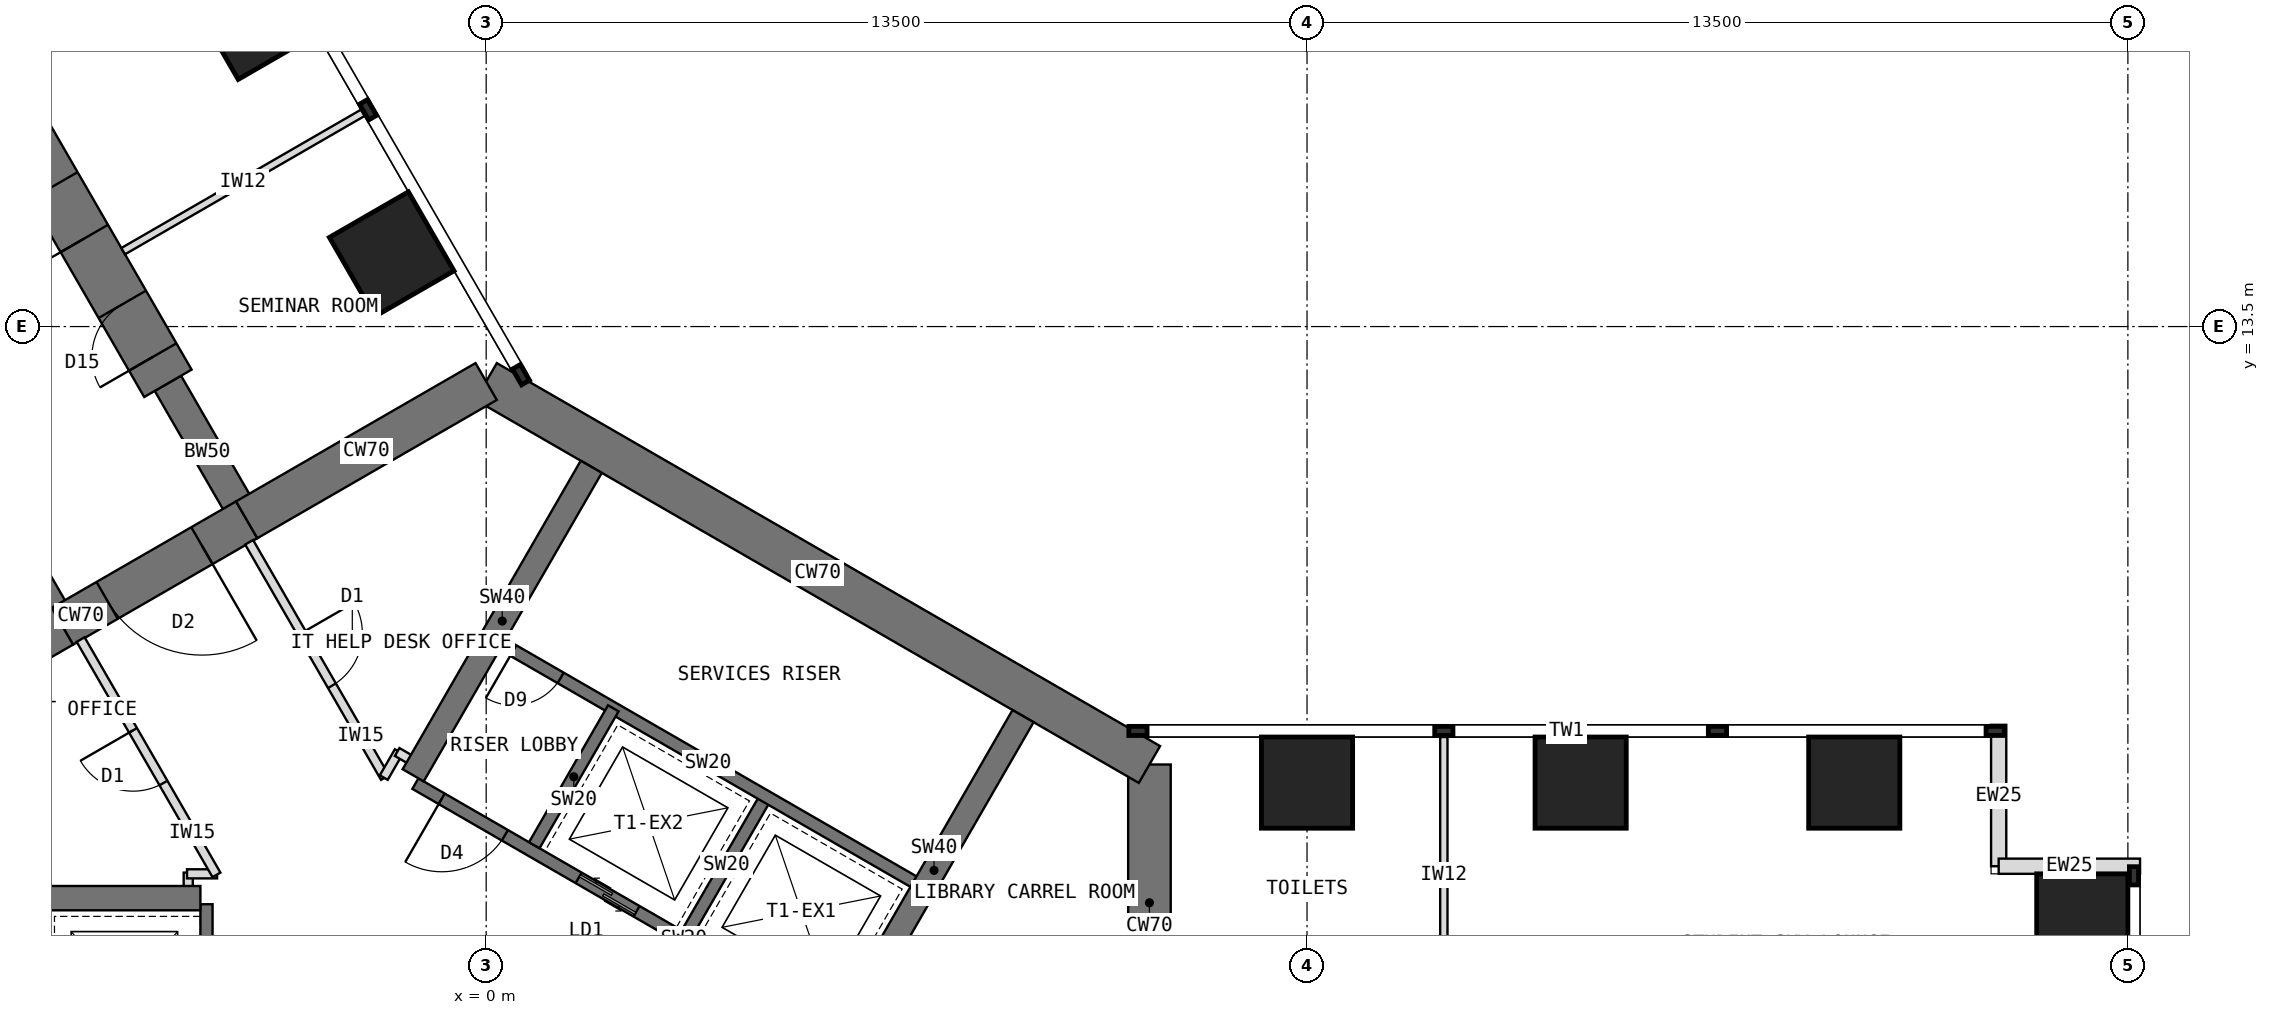
"""IFC4 building model, lengths in metres.
Left out: names, types, materials, properties, quantities, classifications, styles, units other than length and angle.
Written with IfcOpenShell. Run it as: python <this file> out.ifc"""

import sys

from ifc_helpers import new_model, si_unit, direction, frame, frame_2d, origin, origin_2d, place, context, subcontext, project, spatial, rectangle, extrude, element, fill, save


model = new_model("IFC4")
c1 = context("Model", 3, precision=1e-05, world=origin(), true_north=direction((0.0, 1.0)))
c2 = subcontext(c1, "Body", "Model", "MODEL_VIEW")
j1 = project(units=[si_unit("LENGTHUNIT", "METRE"), si_unit("PLANEANGLEUNIT", "RADIAN")], contexts=[c1])
p1 = place(None, origin())
s1 = spatial("IfcSite", under=j1, at=p1, CompositionType="ELEMENT")
p2 = place(p1, origin())
s2 = spatial("IfcBuilding", under=s1, at=p2, CompositionType="ELEMENT")
p3 = place(p2, frame((0.0, 0.0, 20.5)))
s3 = spatial("IfcBuildingStorey", under=s2, at=p3, CompositionType="ELEMENT", Elevation=20.5)
p4 = place(p3, frame((10.908, 1.75, 0.0), z_axis=(0.0, 0.0, 1.0), x_axis=(0.0, 1.0, 0.0)))
e1 = element("IfcWall", 1, at=p4, inside=s3, PredefinedType="SHEAR", context=c2, shape_type="SweptSolid", body=[
    extrude(rectangle(XDim=4.548, YDim=0.7, at=frame_2d((2.274, 0.0))), origin(), (0.0, 0.0, 1.0), 4.0),
])
p5 = place(p3, frame((10.908, 6.298, 0.0), z_axis=(0.0, 0.0, 1.0), x_axis=(-0.866021940709, 0.500005998175, 0.0)))
e2 = element("IfcWall", 2, at=p5, inside=s3, PredefinedType="SHEAR", context=c2, shape_type="SweptSolid", body=[
    extrude(rectangle(XDim=12.596, YDim=0.7, at=frame_2d((6.298, 0.0))), origin(), (0.0, 0.0, 1.0), 4.0),
])
p6 = place(p3, frame((0.0, 12.596, 0.0), z_axis=(0.0, 0.0, 1.0), x_axis=(-0.866011268655, -0.500024481964, 0.0)))
e3 = element("IfcWall", 3, at=p6, inside=s3, PredefinedType="SHEAR", context=c2, shape_type="SweptSolid", body=[
    extrude(rectangle(XDim=4.548, YDim=0.7, at=frame_2d((2.274, 0.0))), origin(), (0.0, 0.0, 1.0), 4.0),
])
p7 = place(p3, frame((-3.939, 10.322, 0.0), z_axis=(0.0, 0.0, 1.0), x_axis=(-0.866019471182, -0.500010275428, 0.0)))
e4 = element("IfcWall", 4, at=p7, inside=s3, PredefinedType="SHEAR", context=c2, shape_type="SweptSolid", body=[
    extrude(rectangle(XDim=3.5, YDim=0.7, at=frame_2d((1.75, 0.0))), origin(), (0.0, 0.0, 1.0), 4.0),
])
p8 = place(p7, frame((0.85, 0.0, 0.0)))
e5 = element("IfcOpeningElement", 5, at=p8, cuts=e4, PredefinedType="OPENING", context=c2, shape_type="SweptSolid", body=[
    extrude(rectangle(XDim=1.8, YDim=2.1, at=frame_2d((0.9, 1.05))), frame((0.0, 0.36, 0.0), z_axis=(0.0, -1.0, 0.0), x_axis=(1.0, 0.0, 0.0)), (0.0, 0.0, 1.0), 0.72),
])
p9 = place(p3, frame((-6.97, 8.572, 0.0), z_axis=(0.0, 0.0, 1.0), x_axis=(-0.866034513004, -0.499984222037, 0.0)))
e6 = element("IfcWall", 6, at=p9, inside=s3, PredefinedType="SHEAR", context=c2, shape_type="SweptSolid", body=[
    extrude(rectangle(XDim=4.548, YDim=0.7, at=frame_2d((2.274, 0.0))), origin(), (0.0, 0.0, 1.0), 4.0),
])
for number, where, z_axis, x_axis in (
    (7, (-6.97, 8.572, 0.0), (0.0, 0.0, 1.0), (-0.5, 0.866, 0.0)),
    (8, (-3.939, 10.322, 0.0), (0.0, 0.0, 1.0), (-0.5, 0.866, 0.0)),
):
    element("IfcWall", number, at=place(p3, frame(where, z_axis=z_axis, x_axis=x_axis)), inside=s3, PredefinedType="SHEAR", context=c2, shape_type="SweptSolid", body=[
        extrude(rectangle(XDim=2.592, YDim=0.5, at=frame_2d((1.296, 0.0))), origin(), (0.0, 0.0, 1.0), 4.0),
    ])
p10 = place(p3, frame((-5.234, 12.566, 0.0), z_axis=(0.0, 0.0, 1.0), x_axis=(-0.500010103361, 0.866019570528, 0.0)))
e9 = element("IfcWall", 9, at=p10, inside=s3, PredefinedType="SHEAR", context=c2, shape_type="SweptSolid", body=[
    extrude(rectangle(XDim=13.2, YDim=0.9, at=frame_2d((6.6, 0.0))), origin(), (0.0, 0.0, 1.0), 4.0),
])
p11 = place(p10, frame((0.5, 0.0, 0.0)))
e10 = element("IfcOpeningElement", 10, at=p11, cuts=e9, PredefinedType="OPENING", context=c2, shape_type="SweptSolid", body=[
    extrude(rectangle(XDim=1.0, YDim=2.1, at=frame_2d((0.5, 1.05))), frame((0.0, 0.46, 0.0), z_axis=(0.0, -1.0, 0.0), x_axis=(1.0, 0.0, 0.0)), (0.0, 0.0, 1.0), 0.92),
])
p12 = place(p10, frame((2.75, 0.0, 0.0)))
e11 = element("IfcOpeningElement", 11, at=p12, cuts=e9, PredefinedType="OPENING", context=c2, shape_type="SweptSolid", body=[
    extrude(rectangle(XDim=1.0, YDim=2.1, at=frame_2d((0.5, 1.05))), frame((0.0, 0.46, 0.0), z_axis=(0.0, -1.0, 0.0), x_axis=(1.0, 0.0, 0.0)), (0.0, 0.0, 1.0), 0.92),
])
for number, where, z_axis, x_axis in (
    (12, (13.5, 6.0, 0.0), (0.0, 0.0, 1.0), (1.0, 0.0, 0.0)),
    (13, (18.0, 6.0, 0.0), (0.0, 0.0, 1.0), (1.0, 0.0, 0.0)),
    (14, (22.5, 6.0, 0.0), (0.0, 0.0, 1.0), (1.0, 0.0, 0.0)),
    (15, (26.25, 3.75, 0.0), (0.0, 0.0, 1.0), (1.0, 0.0, 0.0)),
    (16, (-1.554, 14.691, 0.0), (0.0, 0.0, 1.0), (0.866, 0.5, 0.0)),
    (17, (-3.804, 18.588, 0.0), (0.0, 0.0, 1.0), (0.866, 0.5, 0.0)),
):
    element("IfcColumn", number, at=place(p3, frame(where, z_axis=z_axis, x_axis=x_axis)), inside=s3, PredefinedType="COLUMN", context=c2, shape_type="SweptSolid", body=[
        extrude(rectangle(XDim=1.5, YDim=1.5, at=origin_2d()), origin(), (0.0, 0.0, 1.0), 4.0),
    ])
for number, where, z_axis, x_axis in (
    (18, (24.875, 6.95, 0.0), (0.0, 0.0, 1.0), (0.0, -1.0, 0.0)),
    (19, (24.875, 4.625, 0.0), (0.0, 0.0, 1.0), (1.0, 0.0, 0.0)),
):
    element("IfcWall", number, at=place(p3, frame(where, z_axis=z_axis, x_axis=x_axis)), inside=s3, PredefinedType="STANDARD", context=c2, shape_type="SweptSolid", body=[
        extrude(rectangle(XDim=2.325, YDim=0.25, at=frame_2d((1.163, 0.0))), origin(), (0.0, 0.0, 1.0), 3.8),
    ])
p13 = place(p3, frame((5.764, 1.984, 0.0), z_axis=(0.0, 0.0, 1.0), x_axis=(-0.866026010844, 0.49999894854, 0.0)))
e20 = element("IfcWall", 20, at=p13, inside=s3, PredefinedType="SHEAR", context=c2, shape_type="SweptSolid", body=[
    extrude(rectangle(XDim=8.0, YDim=0.2, at=frame_2d((4.0, 0.0))), origin(), (0.0, 0.0, 1.0), 4.0),
])
p14 = place(p13, frame((6.3, 0.0, 0.0)))
e21 = element("IfcOpeningElement", 21, at=p14, cuts=e20, PredefinedType="OPENING", context=c2, shape_type="SweptSolid", body=[
    extrude(rectangle(XDim=1.2, YDim=2.1, at=frame_2d((0.6, 1.05))), frame((0.0, 0.11, 0.0), z_axis=(0.0, -1.0, 0.0), x_axis=(1.0, 0.0, 0.0)), (0.0, 0.0, 1.0), 0.22),
])
p15 = place(p13, frame((0.9, 0.0, 0.0)))
e22 = element("IfcOpeningElement", 22, at=p15, cuts=e20, PredefinedType="OPENING", context=c2, shape_type="SweptSolid", body=[
    extrude(rectangle(XDim=1.1, YDim=2.2, at=frame_2d((0.55, 1.1))), frame((0.0, 0.11, 0.0), z_axis=(0.0, -1.0, 0.0), x_axis=(1.0, 0.0, 0.0)), (0.0, 0.0, 1.0), 0.22),
])
p16 = place(p13, frame((3.8, 0.0, 0.0)))
e23 = element("IfcOpeningElement", 23, at=p16, cuts=e20, PredefinedType="OPENING", context=c2, shape_type="SweptSolid", body=[
    extrude(rectangle(XDim=1.1, YDim=2.2, at=frame_2d((0.55, 1.1))), frame((0.0, 0.11, 0.0), z_axis=(0.0, -1.0, 0.0), x_axis=(1.0, 0.0, 0.0)), (0.0, 0.0, 1.0), 0.22),
])
for number, where, z_axis, x_axis in (
    (24, (3.303, 3.52, 0.0), (0.0, 0.0, 1.0), (0.5, 0.866, 0.0)),
    (25, (0.791, 4.97, 0.0), (0.0, 0.0, 1.0), (0.5, 0.866, 0.0)),
):
    element("IfcWall", number, at=place(p3, frame(where, z_axis=z_axis, x_axis=x_axis)), inside=s3, PredefinedType="SHEAR", context=c2, shape_type="SweptSolid", body=[
        extrude(rectangle(XDim=2.6, YDim=0.2, at=frame_2d((1.3, 0.0))), origin(), (0.0, 0.0, 1.0), 4.0),
    ])
p17 = place(p3, frame((7.114, 4.322, 0.0), z_axis=(0.0, 0.0, 1.0), x_axis=(-0.866026010844, 0.49999894854, 0.0)))
e26 = element("IfcWall", 26, at=p17, inside=s3, PredefinedType="SHEAR", context=c2, shape_type="SweptSolid", body=[
    extrude(rectangle(XDim=8.0, YDim=0.2, at=frame_2d((4.0, 0.0))), origin(), (0.0, 0.0, 1.0), 4.0),
])
p18 = place(p17, frame((6.8, 0.0, 0.0)))
e27 = element("IfcOpeningElement", 27, at=p18, cuts=e26, PredefinedType="OPENING", context=c2, shape_type="SweptSolid", body=[
    extrude(rectangle(XDim=0.9, YDim=2.1, at=frame_2d((0.45, 1.05))), frame((0.0, 0.11, 0.0), z_axis=(0.0, -1.0, 0.0), x_axis=(1.0, 0.0, 0.0)), (0.0, 0.0, 1.0), 0.22),
])
for number, where, z_axis, x_axis in (
    (28, (-1.201, 6.12, 0.0), (0.0, 0.0, 1.0), (0.5, 0.866, 0.0)),
    (29, (5.901, 2.02, 0.0), (0.0, 0.0, 1.0), (0.5, 0.866, 0.0)),
):
    element("IfcWall", number, at=place(p3, frame(where, z_axis=z_axis, x_axis=x_axis)), inside=s3, PredefinedType="SHEAR", context=c2, shape_type="SweptSolid", body=[
        extrude(rectangle(XDim=5.858, YDim=0.4, at=frame_2d((2.929, 0.0))), origin(), (0.0, 0.0, 1.0), 4.0),
    ])
p19 = place(p3, frame((-4.6, 4.0, 0.0), z_axis=(0.0, 0.0, 1.0), x_axis=(0.0, -1.0, 0.0)))
e30 = element("IfcWall", 30, at=p19, inside=s3, PredefinedType="SHEAR", context=c2, shape_type="SweptSolid", body=[
    extrude(rectangle(XDim=8.0, YDim=0.2, at=frame_2d((4.0, 0.0))), origin(), (0.0, 0.0, 1.0), 4.0),
])
p20 = place(p19, frame((6.3, 0.0, 0.0)))
e31 = element("IfcOpeningElement", 31, at=p20, cuts=e30, PredefinedType="OPENING", context=c2, shape_type="SweptSolid", body=[
    extrude(rectangle(XDim=1.2, YDim=2.1, at=frame_2d((0.6, 1.05))), frame((0.0, 0.11, 0.0), z_axis=(0.0, -1.0, 0.0), x_axis=(1.0, 0.0, 0.0)), (0.0, 0.0, 1.0), 0.22),
])
p21 = place(p19, frame((0.9, 0.0, 0.0)))
e32 = element("IfcOpeningElement", 32, at=p21, cuts=e30, PredefinedType="OPENING", context=c2, shape_type="SweptSolid", body=[
    extrude(rectangle(XDim=1.1, YDim=2.2, at=frame_2d((0.55, 1.1))), frame((0.0, 0.11, 0.0), z_axis=(0.0, -1.0, 0.0), x_axis=(1.0, 0.0, 0.0)), (0.0, 0.0, 1.0), 0.22),
])
p22 = place(p3, frame((-4.7, 4.1, 0.0), z_axis=(0.0, 0.0, 1.0), x_axis=(-1.0, 0.0, 0.0)))
e33 = element("IfcWall", 33, at=p22, inside=s3, PredefinedType="SHEAR", context=c2, shape_type="SweptSolid", body=[
    extrude(rectangle(XDim=5.858, YDim=0.4, at=frame_2d((2.929, 0.0))), origin(), (0.0, 0.0, 1.0), 4.0),
])
for number, where, z_axis, x_axis in (
    (34, (15.75, 2.2, 0.0), (0.0, 0.0, 1.0), (0.0, 1.0, 0.0)),
    (35, (-5.97, 14.74, 0.0), (0.0, 0.0, 1.0), (0.866, 0.5, 0.0)),
):
    element("IfcWall", number, at=place(p3, frame(where, z_axis=z_axis, x_axis=x_axis)), inside=s3, PredefinedType="PARTITIONING", context=c2, shape_type="SweptSolid", body=[
        extrude(rectangle(XDim=4.55, YDim=0.12, at=frame_2d((2.275, 0.0))), origin(), (0.0, 0.0, 1.0), 3.8),
    ])
p23 = place(p3, frame((-4.9, 4.09, 0.0), z_axis=(0.0, 0.0, 1.0), x_axis=(0.0, 1.0, 0.0)))
e36 = element("IfcWall", 36, at=p23, inside=s3, PredefinedType="PARTITIONING", context=c2, shape_type="SweptSolid", body=[
    extrude(rectangle(XDim=0.43, YDim=0.15, at=frame_2d((0.215, 0.0))), origin(), (0.0, 0.0, 1.0), 3.8),
])
p24 = place(p3, frame((-4.92, 4.5, 0.0), z_axis=(0.0, 0.0, 1.0), x_axis=(1.0, 0.0, 0.0)))
e37 = element("IfcWall", 37, at=p24, inside=s3, PredefinedType="PARTITIONING", context=c2, shape_type="SweptSolid", body=[
    extrude(rectangle(XDim=0.494, YDim=0.15, at=frame_2d((0.247, 0.0))), origin(), (0.0, 0.0, 1.0), 3.8),
])
p25 = place(p3, frame((-4.436, 4.483, 0.0), z_axis=(0.0, 0.0, 1.0), x_axis=(-0.500017246033, 0.866015446554, 0.0)))
e38 = element("IfcWall", 38, at=p25, inside=s3, PredefinedType="PARTITIONING", context=c2, shape_type="SweptSolid", body=[
    extrude(rectangle(XDim=4.469, YDim=0.15, at=frame_2d((2.234, 0.0))), origin(), (0.0, 0.0, 1.0), 3.8),
])
p26 = place(p25, frame((1.744, 0.0, 0.0)))
e39 = element("IfcOpeningElement", 39, at=p26, cuts=e38, PredefinedType="OPENING", context=c2, shape_type="SweptSolid", body=[
    extrude(rectangle(XDim=1.0, YDim=2.1, at=frame_2d((0.5, 1.05))), frame((0.0, 0.085, 0.0), z_axis=(0.0, -1.0, 0.0), x_axis=(1.0, 0.0, 0.0)), (0.0, 0.0, 1.0), 0.17),
])
p27 = place(p3, frame((-3.898, 9.952, 0.0), z_axis=(0.0, 0.0, 1.0), x_axis=(0.499999927604, -0.866025445582, 0.0)))
e40 = element("IfcWall", 40, at=p27, inside=s3, PredefinedType="PARTITIONING", context=c2, shape_type="SweptSolid", body=[
    extrude(rectangle(XDim=4.468, YDim=0.15, at=frame_2d((2.234, 0.0))), origin(), (0.0, 0.0, 1.0), 3.8),
])
p28 = place(p27, frame((1.724, 0.0, 0.0)))
e41 = element("IfcOpeningElement", 41, at=p28, cuts=e40, PredefinedType="OPENING", context=c2, shape_type="SweptSolid", body=[
    extrude(rectangle(XDim=1.0, YDim=2.1, at=frame_2d((0.5, 1.05))), frame((0.0, 0.085, 0.0), z_axis=(0.0, -1.0, 0.0), x_axis=(1.0, 0.0, 0.0)), (0.0, 0.0, 1.0), 0.17),
])
p29 = place(p3, frame((-1.684, 6.083, 0.0), z_axis=(0.0, 0.0, 1.0), x_axis=(0.50033519877, 0.865831790172, 0.0)))
e42 = element("IfcWall", 42, at=p29, inside=s3, PredefinedType="PARTITIONING", context=c2, shape_type="SweptSolid", body=[
    extrude(rectangle(XDim=0.494, YDim=0.15, at=frame_2d((0.247, 0.0))), origin(), (0.0, 0.0, 1.0), 3.8),
])
p30 = place(p3, frame((-1.464, 6.503, 0.0), z_axis=(0.0, 0.0, 1.0), x_axis=(0.866138304741, -0.499804398801, 0.0)))
e43 = element("IfcWall", 43, at=p30, inside=s3, PredefinedType="PARTITIONING", context=c2, shape_type="SweptSolid", body=[
    extrude(rectangle(XDim=0.43, YDim=0.15, at=frame_2d((0.215, 0.0))), origin(), (0.0, 0.0, 1.0), 3.8),
])
p31 = place(p14, origin())
e44 = element("IfcDoor", 44, at=p31, inside=s3, OperationType="SINGLE_SWING_RIGHT", PredefinedType="DOOR", context=c2, shape_type="SweptSolid", body=[
    extrude(rectangle(XDim=1.2, YDim=2.1, at=frame_2d((0.6, 1.05))), frame((0.0, 0.025, 0.0), z_axis=(0.0, -1.0, 0.0), x_axis=(1.0, 0.0, 0.0)), (0.0, 0.0, 1.0), 0.05),
])
fill(e21, e44)
p32 = place(p16, origin())
e45 = element("IfcDoor", 45, at=p32, inside=s3, OperationType="DOUBLE_DOOR_SLIDING", PredefinedType="DOOR", context=c2, shape_type="SweptSolid", body=[
    extrude(rectangle(XDim=1.1, YDim=2.2, at=frame_2d((0.55, 1.1))), frame((0.0, 0.025, 0.0), z_axis=(0.0, -1.0, 0.0), x_axis=(1.0, 0.0, 0.0)), (0.0, 0.0, 1.0), 0.05),
])
fill(e23, e45)
p33 = place(p18, origin())
e46 = element("IfcDoor", 46, at=p33, inside=s3, OperationType="SINGLE_SWING_RIGHT", PredefinedType="DOOR", context=c2, shape_type="SweptSolid", body=[
    extrude(rectangle(XDim=0.9, YDim=2.1, at=frame_2d((0.45, 1.05))), frame((0.0, 0.025, 0.0), z_axis=(0.0, -1.0, 0.0), x_axis=(1.0, 0.0, 0.0)), (0.0, 0.0, 1.0), 0.05),
])
fill(e27, e46)
p34 = place(p8, origin())
e47 = element("IfcDoor", 47, at=p34, inside=s3, OperationType="DOUBLE_DOOR_DOUBLE_SWING", PredefinedType="DOOR", context=c2, shape_type="SweptSolid", body=[
    extrude(rectangle(XDim=1.72, YDim=2.06, at=frame_2d((0.9, 1.03))), frame((0.0, 0.025, 0.0), z_axis=(0.0, -1.0, 0.0), x_axis=(1.0, 0.0, 0.0)), (0.0, 0.0, 1.0), 0.05),
    extrude(rectangle(XDim=0.04, YDim=2.1, at=frame_2d((0.02, 1.05))), frame((0.0, 0.35, 0.0), z_axis=(0.0, -1.0, 0.0), x_axis=(1.0, 0.0, 0.0)), (0.0, 0.0, 1.0), 0.699),
    extrude(rectangle(XDim=0.04, YDim=2.1, at=frame_2d((1.78, 1.05))), frame((0.0, 0.35, 0.0), z_axis=(0.0, -1.0, 0.0), x_axis=(1.0, 0.0, 0.0)), (0.0, 0.0, 1.0), 0.699),
    extrude(rectangle(XDim=1.72, YDim=0.04, at=frame_2d((0.9, 2.08))), frame((0.0, 0.35, 0.0), z_axis=(0.0, -1.0, 0.0), x_axis=(1.0, 0.0, 0.0)), (0.0, 0.0, 1.0), 0.699),
])
fill(e5, e47)
p35 = place(p28, origin())
e48 = element("IfcDoor", 48, at=p35, inside=s3, OperationType="SINGLE_SWING_LEFT", PredefinedType="DOOR", context=c2, shape_type="SweptSolid", body=[
    extrude(rectangle(XDim=1.0, YDim=2.1, at=frame_2d((0.5, 1.05))), frame((0.0, 0.025, 0.0), z_axis=(0.0, -1.0, 0.0), x_axis=(1.0, 0.0, 0.0)), (0.0, 0.0, 1.0), 0.05),
])
fill(e41, e48)
p36 = place(p26, origin())
e49 = element("IfcDoor", 49, at=p36, inside=s3, OperationType="SINGLE_SWING_RIGHT", PredefinedType="DOOR", context=c2, shape_type="SweptSolid", body=[
    extrude(rectangle(XDim=1.0, YDim=2.1, at=frame_2d((0.5, 1.05))), frame((0.0, 0.025, 0.0), z_axis=(0.0, -1.0, 0.0), x_axis=(1.0, 0.0, 0.0)), (0.0, 0.0, 1.0), 0.05),
])
fill(e39, e49)
p37 = place(p11, origin())
e50 = element("IfcDoor", 50, at=p37, inside=s3, OperationType="SINGLE_SWING_LEFT", PredefinedType="DOOR", context=c2, shape_type="SweptSolid", body=[
    extrude(rectangle(XDim=0.92, YDim=2.06, at=frame_2d((0.5, 1.03))), frame((0.0, 0.025, 0.0), z_axis=(0.0, -1.0, 0.0), x_axis=(1.0, 0.0, 0.0)), (0.0, 0.0, 1.0), 0.05),
    extrude(rectangle(XDim=0.04, YDim=2.1, at=frame_2d((0.02, 1.05))), frame((0.0, 0.45, 0.0), z_axis=(0.0, -1.0, 0.0), x_axis=(1.0, 0.0, 0.0)), (0.0, 0.0, 1.0), 0.899),
    extrude(rectangle(XDim=0.04, YDim=2.1, at=frame_2d((0.98, 1.05))), frame((0.0, 0.45, 0.0), z_axis=(0.0, -1.0, 0.0), x_axis=(1.0, 0.0, 0.0)), (0.0, 0.0, 1.0), 0.899),
    extrude(rectangle(XDim=0.92, YDim=0.04, at=frame_2d((0.5, 2.08))), frame((0.0, 0.45, 0.0), z_axis=(0.0, -1.0, 0.0), x_axis=(1.0, 0.0, 0.0)), (0.0, 0.0, 1.0), 0.899),
])
fill(e10, e50)
p38 = place(p12, origin())
e51 = element("IfcDoor", 51, at=p38, inside=s3, OperationType="SINGLE_SWING_LEFT", PredefinedType="DOOR", context=c2, shape_type="SweptSolid", body=[
    extrude(rectangle(XDim=0.92, YDim=2.06, at=frame_2d((0.5, 1.03))), frame((0.0, 0.025, 0.0), z_axis=(0.0, -1.0, 0.0), x_axis=(1.0, 0.0, 0.0)), (0.0, 0.0, 1.0), 0.05),
    extrude(rectangle(XDim=0.04, YDim=2.1, at=frame_2d((0.02, 1.05))), frame((0.0, 0.45, 0.0), z_axis=(0.0, -1.0, 0.0), x_axis=(1.0, 0.0, 0.0)), (0.0, 0.0, 1.0), 0.899),
    extrude(rectangle(XDim=0.04, YDim=2.1, at=frame_2d((0.98, 1.05))), frame((0.0, 0.45, 0.0), z_axis=(0.0, -1.0, 0.0), x_axis=(1.0, 0.0, 0.0)), (0.0, 0.0, 1.0), 0.899),
    extrude(rectangle(XDim=0.92, YDim=0.04, at=frame_2d((0.5, 2.08))), frame((0.0, 0.45, 0.0), z_axis=(0.0, -1.0, 0.0), x_axis=(1.0, 0.0, 0.0)), (0.0, 0.0, 1.0), 0.899),
])
fill(e11, e51)
save(model, sys.argv[1])
